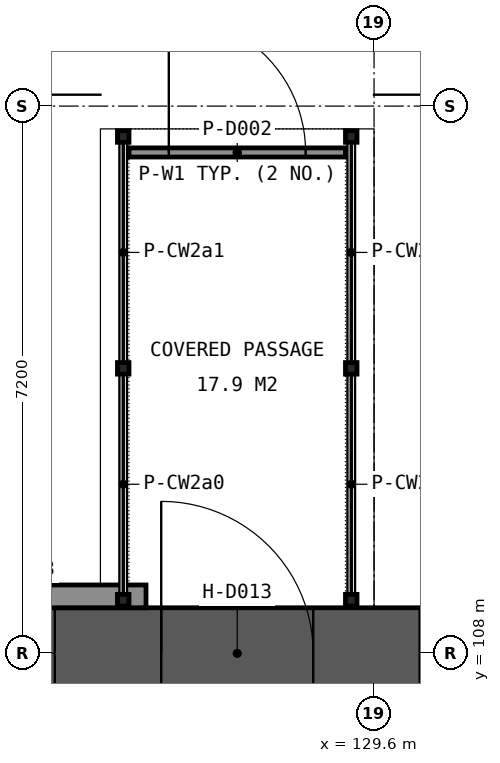
"""IFC4 building model, lengths in metres.
Left out: names, types, materials, properties, quantities, classifications, styles, units other than length and angle.
Written with IfcOpenShell. Run it as: python <this file> out.ifc"""

import sys

from ifc_helpers import new_model, si_unit, direction, frame, frame_2d, origin, origin_2d, place, context, subcontext, project, spatial, rectangle, hollow_rectangle, extrude, element, fill, save


model = new_model("IFC4")
c1 = context("Model", 3, precision=1e-05, world=origin(), true_north=direction((0.0, 1.0)))
c2 = subcontext(c1, "Body", "Model", "MODEL_VIEW")
j1 = project(units=[si_unit("LENGTHUNIT", "METRE"), si_unit("PLANEANGLEUNIT", "RADIAN")], contexts=[c1])
p1 = place(None, origin())
s1 = spatial("IfcSite", under=j1, at=p1, CompositionType="ELEMENT")
p2 = place(p1, origin())
s2 = spatial("IfcBuilding", under=s1, at=p2, CompositionType="ELEMENT")
p3 = place(p2, frame((0.0, 0.0, 4.8)))
s3 = spatial("IfcBuildingStorey", under=s2, at=p3, CompositionType="ELEMENT", Elevation=4.8)
p4 = place(p3, frame((123.0, 108.0, 0.0), z_axis=(0.0, 0.0, 1.0), x_axis=(1.0, 0.0, 0.0)))
e1 = element("IfcWall", 1, at=p4, inside=s3, PredefinedType="SOLIDWALL", context=c2, shape_type="SweptSolid", body=[
    extrude(rectangle(XDim=13.2, YDim=1.2, at=frame_2d((6.6, 0.0))), origin(), (0.0, 0.0, 1.0), 4.8),
])
p5 = place(p4, frame((3.8, 0.0, 0.0)))
e2 = element("IfcOpeningElement", 2, at=p5, cuts=e1, PredefinedType="OPENING", context=c2, shape_type="SweptSolid", body=[
    extrude(rectangle(XDim=2.0, YDim=2.4, at=frame_2d((1.0, 1.2))), frame((0.0, 0.61, 0.0), z_axis=(0.0, -1.0, 0.0), x_axis=(1.0, 0.0, 0.0)), (0.0, 0.0, 1.0), 1.22),
])
p6 = place(p4, frame((0.0, 0.0, 1.2)))
e3 = element("IfcOpeningElement", 3, at=p6, cuts=e1, PredefinedType="OPENING", context=c2, shape_type="SweptSolid", body=[
    extrude(rectangle(XDim=0.9, YDim=3.0, at=frame_2d((0.45, 1.5))), frame((0.0, 0.61, 0.0), z_axis=(0.0, -1.0, 0.0), x_axis=(1.0, 0.0, 0.0)), (0.0, 0.0, 1.0), 1.22),
])
p7 = place(p4, frame((1.5, 0.0, 1.2)))
e4 = element("IfcOpeningElement", 4, at=p7, cuts=e1, PredefinedType="OPENING", context=c2, shape_type="SweptSolid", body=[
    extrude(rectangle(XDim=0.9, YDim=3.0, at=frame_2d((0.45, 1.5))), frame((0.0, 0.61, 0.0), z_axis=(0.0, -1.0, 0.0), x_axis=(1.0, 0.0, 0.0)), (0.0, 0.0, 1.0), 1.22),
])
p8 = place(p4, frame((7.2, 0.0, 1.2)))
e5 = element("IfcOpeningElement", 5, at=p8, cuts=e1, PredefinedType="OPENING", context=c2, shape_type="SweptSolid", body=[
    extrude(rectangle(XDim=0.9, YDim=3.0, at=frame_2d((0.45, 1.5))), frame((0.0, 0.61, 0.0), z_axis=(0.0, -1.0, 0.0), x_axis=(1.0, 0.0, 0.0)), (0.0, 0.0, 1.0), 1.22),
])
p9 = place(p4, frame((8.7, 0.0, 1.2)))
e6 = element("IfcOpeningElement", 6, at=p9, cuts=e1, PredefinedType="OPENING", context=c2, shape_type="SweptSolid", body=[
    extrude(rectangle(XDim=0.9, YDim=3.0, at=frame_2d((0.45, 1.5))), frame((0.0, 0.61, 0.0), z_axis=(0.0, -1.0, 0.0), x_axis=(1.0, 0.0, 0.0)), (0.0, 0.0, 1.0), 1.22),
])
p10 = place(p4, frame((10.8, 0.0, 1.2)))
e7 = element("IfcOpeningElement", 7, at=p10, cuts=e1, PredefinedType="OPENING", context=c2, shape_type="SweptSolid", body=[
    extrude(rectangle(XDim=0.9, YDim=3.0, at=frame_2d((0.45, 1.5))), frame((0.0, 0.61, 0.0), z_axis=(0.0, -1.0, 0.0), x_axis=(1.0, 0.0, 0.0)), (0.0, 0.0, 1.0), 1.22),
])
p11 = place(p4, frame((12.3, 0.0, 1.2)))
e8 = element("IfcOpeningElement", 8, at=p11, cuts=e1, PredefinedType="OPENING", context=c2, shape_type="SweptSolid", body=[
    extrude(rectangle(XDim=0.9, YDim=3.0, at=frame_2d((0.45, 1.5))), frame((0.0, 0.61, 0.0), z_axis=(0.0, -1.0, 0.0), x_axis=(1.0, 0.0, 0.0)), (0.0, 0.0, 1.0), 1.22),
])
for number, where, z_axis, x_axis in (
    (9, (126.3, 108.7, 0.0), (0.0, 0.0, 1.0), (1.0, 0.0, 0.0)),
    (10, (126.3, 111.75, 0.0), (0.0, 0.0, 1.0), (1.0, 0.0, 0.0)),
    (11, (126.3, 114.8, 0.0), (0.0, 0.0, 1.0), (1.0, 0.0, 0.0)),
    (12, (129.3, 108.7, 0.0), (0.0, 0.0, 1.0), (1.0, 0.0, 0.0)),
    (13, (129.3, 111.75, 0.0), (0.0, 0.0, 1.0), (1.0, 0.0, 0.0)),
    (14, (129.3, 114.8, 0.0), (0.0, 0.0, 1.0), (1.0, 0.0, 0.0)),
):
    element("IfcColumn", number, at=place(p3, frame(where, z_axis=z_axis, x_axis=x_axis)), inside=s3, PredefinedType="COLUMN", context=c2, shape_type="SweptSolid", body=[
        extrude(hollow_rectangle(XDim=0.152, YDim=0.152, WallThickness=0.01, at=origin_2d()), origin(), (0.0, 0.0, 1.0), 2.753),
    ])
p12 = place(p3, frame((123.0, 108.75, 0.0), z_axis=(0.0, 0.0, 1.0), x_axis=(1.0, 0.0, 0.0)))
e15 = element("IfcWall", 15, at=p12, inside=s3, PredefinedType="SOLIDWALL", context=c2, shape_type="SweptSolid", body=[
    extrude(rectangle(XDim=3.6, YDim=0.3, at=frame_2d((1.8, 0.0))), origin(), (0.0, 0.0, 1.0), 1.2),
])
p13 = place(p3, frame((126.376, 114.59, 0.0), z_axis=(0.0, 0.0, 1.0), x_axis=(1.0, 0.0, 0.0)))
e16 = element("IfcWall", 16, at=p13, inside=s3, PredefinedType="SOLIDWALL", context=c2, shape_type="SweptSolid", body=[
    extrude(rectangle(XDim=2.848, YDim=0.12, at=frame_2d((1.424, 0.0))), origin(), (0.0, 0.0, 1.0), 2.753),
])
p14 = place(p13, frame((0.524, 0.0, 0.0)))
e17 = element("IfcOpeningElement", 17, at=p14, cuts=e16, PredefinedType="OPENING", context=c2, shape_type="SweptSolid", body=[
    extrude(rectangle(XDim=1.8, YDim=2.4, at=frame_2d((0.9, 1.2))), frame((0.0, 0.07, 0.0), z_axis=(0.0, -1.0, 0.0), x_axis=(1.0, 0.0, 0.0)), (0.0, 0.0, 1.0), 0.14),
])
p15 = place(p3, frame((75.6, 115.6, 0.0), z_axis=(0.0, 0.0, 1.0), x_axis=(1.0, 0.0, 0.0)))
e18 = element("IfcWall", 18, at=p15, inside=s3, PredefinedType="SOLIDWALL", context=c2, shape_type="SweptSolid", body=[
    extrude(rectangle(XDim=50.4, YDim=0.3, at=frame_2d((25.2, 0.0))), origin(), (0.0, 0.0, 1.0), 0.8),
])
p16 = place(p3, frame((129.6, 115.6, 0.0), z_axis=(0.0, 0.0, 1.0), x_axis=(1.0, 0.0, 0.0)))
e19 = element("IfcWall", 19, at=p16, inside=s3, PredefinedType="SOLIDWALL", context=c2, shape_type="SweptSolid", body=[
    extrude(rectangle(XDim=21.45, YDim=0.3, at=frame_2d((10.725, 0.0))), origin(), (0.0, 0.0, 1.0), 0.8),
])
p17 = place(p5, origin())
e20 = element("IfcDoor", 20, at=p17, inside=s3, OperationType="DOUBLE_DOOR_SINGLE_SWING", PredefinedType="DOOR", context=c2, shape_type="SweptSolid", body=[
    extrude(rectangle(XDim=2.0, YDim=2.4, at=frame_2d((1.0, 1.2))), frame((0.0, 0.025, 0.0), z_axis=(0.0, -1.0, 0.0), x_axis=(1.0, 0.0, 0.0)), (0.0, 0.0, 1.0), 0.05),
])
fill(e2, e20)
p18 = place(p7, origin())
e21 = element("IfcWindow", 21, at=p18, inside=s3, PartitioningType="SINGLE_PANEL", PredefinedType="WINDOW", context=c2, shape_type="SweptSolid", body=[
    extrude(rectangle(XDim=0.9, YDim=3.0, at=frame_2d((0.45, 1.5))), frame((0.0, 0.61, 0.0), z_axis=(0.0, -1.0, 0.0), x_axis=(1.0, 0.0, 0.0)), (0.0, 0.0, 1.0), 0.06),
])
fill(e4, e21)
p19 = place(p8, origin())
e22 = element("IfcWindow", 22, at=p19, inside=s3, PartitioningType="SINGLE_PANEL", PredefinedType="WINDOW", context=c2, shape_type="SweptSolid", body=[
    extrude(rectangle(XDim=0.9, YDim=3.0, at=frame_2d((0.45, 1.5))), frame((0.0, 0.61, 0.0), z_axis=(0.0, -1.0, 0.0), x_axis=(1.0, 0.0, 0.0)), (0.0, 0.0, 1.0), 0.06),
])
fill(e5, e22)
p20 = place(p14, origin())
e23 = element("IfcDoor", 23, at=p20, inside=s3, OperationType="DOUBLE_DOOR_DOUBLE_SWING", PredefinedType="DOOR", context=c2, shape_type="SweptSolid", body=[
    extrude(rectangle(XDim=1.8, YDim=2.4, at=frame_2d((0.9, 1.2))), frame((0.0, 0.025, 0.0), z_axis=(0.0, -1.0, 0.0), x_axis=(1.0, 0.0, 0.0)), (0.0, 0.0, 1.0), 0.05),
])
fill(e17, e23)
save(model, sys.argv[1])
